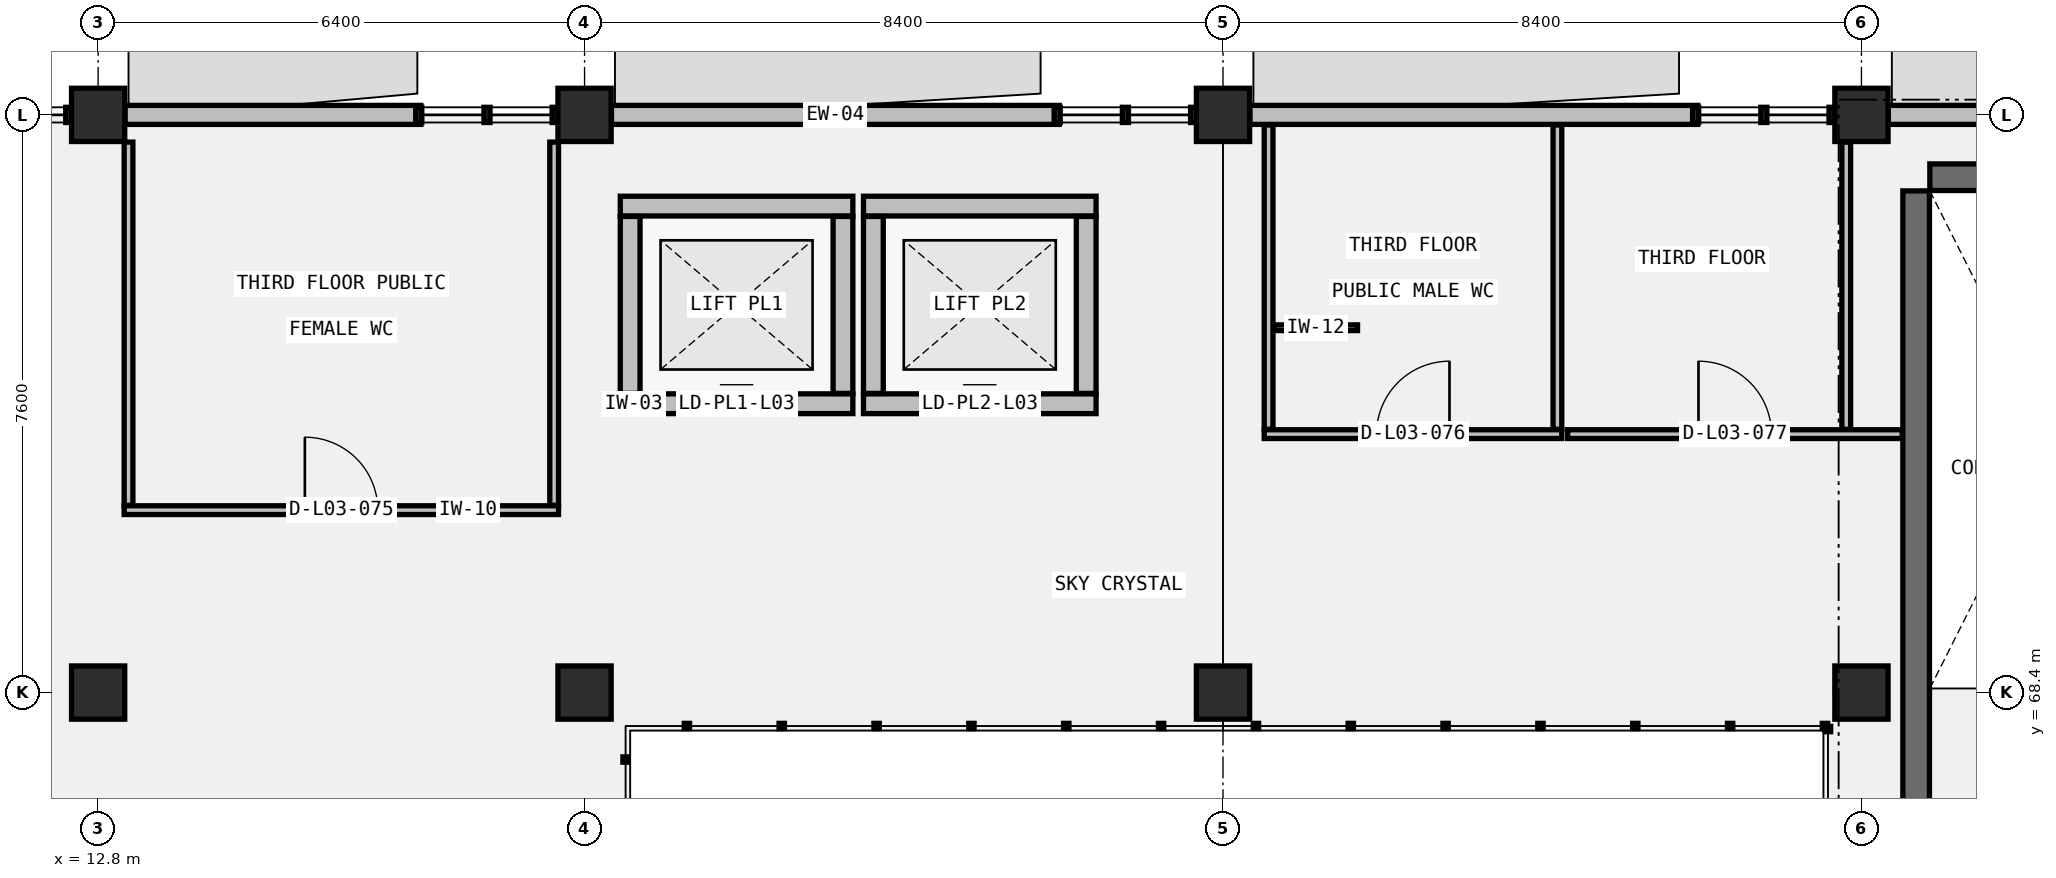
"""IFC4 building model, lengths in metres.
Left out: names, types, materials, properties, quantities, classifications, styles, units other than length and angle.
Written with IfcOpenShell. Run it as: python <this file> out.ifc"""

import sys

from ifc_helpers import new_model, si_unit, direction, frame, frame_2d, origin, origin_2d, place, context, subcontext, project, spatial, rectangle, circle, extrude, element, fill, save


model = new_model("IFC4")
c1 = context("Model", 3, precision=1e-05, world=origin(), true_north=direction((0.0, 1.0)))
c2 = subcontext(c1, "Body", "Model", "MODEL_VIEW")
j1 = project(units=[si_unit("LENGTHUNIT", "METRE"), si_unit("PLANEANGLEUNIT", "RADIAN")], contexts=[c1])
p1 = place(None, origin())
s1 = spatial("IfcSite", under=j1, at=p1, CompositionType="ELEMENT")
p2 = place(p1, origin())
s2 = spatial("IfcBuilding", under=s1, at=p2, CompositionType="ELEMENT")
p3 = place(p2, frame((0.0, 0.0, 14.6)))
s3 = spatial("IfcBuildingStorey", under=s2, at=p3, CompositionType="ELEMENT", Elevation=14.6)
for number, where, z_axis, x_axis in (
    (1, (12.8, 68.4, 0.0), (0.0, 0.0, 1.0), (1.0, 0.0, 0.0)),
    (2, (12.8, 76.0, 0.0), (0.0, 0.0, 1.0), (1.0, 0.0, 0.0)),
    (3, (19.2, 68.4, 0.0), (0.0, 0.0, 1.0), (1.0, 0.0, 0.0)),
    (4, (19.2, 76.0, 0.0), (0.0, 0.0, 1.0), (1.0, 0.0, 0.0)),
    (5, (27.6, 68.4, 0.0), (0.0, 0.0, 1.0), (1.0, 0.0, 0.0)),
    (6, (27.6, 76.0, 0.0), (0.0, 0.0, 1.0), (1.0, 0.0, 0.0)),
    (7, (36.0, 68.4, 0.0), (0.0, 0.0, 1.0), (1.0, 0.0, 0.0)),
    (8, (36.0, 76.0, 0.0), (0.0, 0.0, 1.0), (1.0, 0.0, 0.0)),
):
    element("IfcColumn", number, at=place(p3, frame(where, z_axis=z_axis, x_axis=x_axis)), inside=s3, PredefinedType="COLUMN", context=c2, shape_type="SweptSolid", body=[
        extrude(circle(Radius=0.35, at=origin_2d()), origin(), (0.0, 0.0, 1.0), 4.6),
    ])
p4 = place(p3, frame((40.2, 75.18, 0.0), z_axis=(0.0, 0.0, 1.0), x_axis=(-1.0, 0.0, 0.0)))
e9 = element("IfcWall", 9, at=p4, inside=s3, PredefinedType="SHEAR", context=c2, shape_type="SweptSolid", body=[
    extrude(rectangle(XDim=3.3, YDim=0.35, at=frame_2d((1.65, 0.0))), origin(), (0.0, 0.0, 1.0), 4.36),
])
p5 = place(p3, frame((36.72, 75.0, 0.0), z_axis=(0.0, 0.0, 1.0), x_axis=(0.0, -1.0, 0.0)))
e10 = element("IfcWall", 10, at=p5, inside=s3, PredefinedType="SHEAR", context=c2, shape_type="SweptSolid", body=[
    extrude(rectangle(XDim=8.15, YDim=0.35, at=frame_2d((4.075, 0.0))), origin(), (0.0, 0.0, 1.0), 4.36),
])
p6 = place(p3, frame((13.154, 76.0, 0.0), z_axis=(0.0, 0.0, 1.0), x_axis=(1.0, 0.0, 0.0)))
e11 = element("IfcWall", 11, at=p6, inside=s3, PredefinedType="STANDARD", context=c2, shape_type="SweptSolid", body=[
    extrude(rectangle(XDim=3.892, YDim=0.25, at=frame_2d((1.946, 0.0))), origin(), (0.0, 0.0, 1.0), 3.638),
])
p7 = place(p3, frame((19.554, 76.0, 0.0), z_axis=(0.0, 0.0, 1.0), x_axis=(1.0, 0.0, 0.0)))
e12 = element("IfcWall", 12, at=p7, inside=s3, PredefinedType="STANDARD", context=c2, shape_type="SweptSolid", body=[
    extrude(rectangle(XDim=5.892, YDim=0.25, at=frame_2d((2.946, 0.0))), origin(), (0.0, 0.0, 1.0), 3.638),
])
p8 = place(p3, frame((27.954, 76.0, 0.0), z_axis=(0.0, 0.0, 1.0), x_axis=(1.0, 0.0, 0.0)))
e13 = element("IfcWall", 13, at=p8, inside=s3, PredefinedType="STANDARD", context=c2, shape_type="SweptSolid", body=[
    extrude(rectangle(XDim=5.892, YDim=0.25, at=frame_2d((2.946, 0.0))), origin(), (0.0, 0.0, 1.0), 4.34),
])
p9 = place(p3, frame((36.354, 76.0, 0.0), z_axis=(0.0, 0.0, 1.0), x_axis=(1.0, 0.0, 0.0)))
e14 = element("IfcWall", 14, at=p9, inside=s3, PredefinedType="STANDARD", context=c2, shape_type="SweptSolid", body=[
    extrude(rectangle(XDim=5.842, YDim=0.25, at=frame_2d((2.921, 0.0))), origin(), (0.0, 0.0, 1.0), 4.34),
])
p10 = place(p3, frame((19.67, 72.2, 0.0), z_axis=(0.0, 0.0, 1.0), x_axis=(1.0, 0.0, 0.0)))
e15 = element("IfcWall", 15, at=p10, inside=s3, PredefinedType="STANDARD", context=c2, shape_type="SweptSolid", body=[
    extrude(rectangle(XDim=3.06, YDim=0.26, at=frame_2d((1.53, 0.0))), origin(), (0.0, 0.0, 1.0), 4.36),
])
p11 = place(p10, frame((0.955, 0.0, 0.0)))
e16 = element("IfcOpeningElement", 16, at=p11, cuts=e15, PredefinedType="OPENING", context=c2, shape_type="SweptSolid", body=[
    extrude(rectangle(XDim=1.15, YDim=2.15, at=frame_2d((0.575, 1.075))), frame((0.0, 0.14, 0.0), z_axis=(0.0, -1.0, 0.0), x_axis=(1.0, 0.0, 0.0)), (0.0, 0.0, 1.0), 0.28),
])
p12 = place(p3, frame((19.67, 74.8, 0.0), z_axis=(0.0, 0.0, 1.0), x_axis=(1.0, 0.0, 0.0)))
e17 = element("IfcWall", 17, at=p12, inside=s3, PredefinedType="STANDARD", context=c2, shape_type="SweptSolid", body=[
    extrude(rectangle(XDim=3.06, YDim=0.26, at=frame_2d((1.53, 0.0))), origin(), (0.0, 0.0, 1.0), 4.36),
])
for number, where, z_axis, x_axis in (
    (18, (19.8, 72.336, 0.0), (0.0, 0.0, 1.0), (0.0, 1.0, 0.0)),
    (19, (22.6, 72.336, 0.0), (0.0, 0.0, 1.0), (0.0, 1.0, 0.0)),
):
    element("IfcWall", number, at=place(p3, frame(where, z_axis=z_axis, x_axis=x_axis)), inside=s3, PredefinedType="STANDARD", context=c2, shape_type="SweptSolid", body=[
        extrude(rectangle(XDim=2.328, YDim=0.26, at=frame_2d((1.164, 0.0))), origin(), (0.0, 0.0, 1.0), 4.36),
    ])
p13 = place(p3, frame((22.87, 72.2, 0.0), z_axis=(0.0, 0.0, 1.0), x_axis=(1.0, 0.0, 0.0)))
e20 = element("IfcWall", 20, at=p13, inside=s3, PredefinedType="STANDARD", context=c2, shape_type="SweptSolid", body=[
    extrude(rectangle(XDim=3.06, YDim=0.26, at=frame_2d((1.53, 0.0))), origin(), (0.0, 0.0, 1.0), 4.36),
])
p14 = place(p13, frame((0.92, 0.0, 0.0)))
e21 = element("IfcOpeningElement", 21, at=p14, cuts=e20, PredefinedType="OPENING", context=c2, shape_type="SweptSolid", body=[
    extrude(rectangle(XDim=1.22, YDim=2.2, at=frame_2d((0.61, 1.1))), frame((0.0, 0.14, 0.0), z_axis=(0.0, -1.0, 0.0), x_axis=(1.0, 0.0, 0.0)), (0.0, 0.0, 1.0), 0.28),
])
p15 = place(p3, frame((22.87, 74.8, 0.0), z_axis=(0.0, 0.0, 1.0), x_axis=(1.0, 0.0, 0.0)))
e22 = element("IfcWall", 22, at=p15, inside=s3, PredefinedType="STANDARD", context=c2, shape_type="SweptSolid", body=[
    extrude(rectangle(XDim=3.06, YDim=0.26, at=frame_2d((1.53, 0.0))), origin(), (0.0, 0.0, 1.0), 4.36),
])
for number, where, z_axis, x_axis in (
    (23, (23.0, 72.336, 0.0), (0.0, 0.0, 1.0), (0.0, 1.0, 0.0)),
    (24, (25.8, 72.336, 0.0), (0.0, 0.0, 1.0), (0.0, 1.0, 0.0)),
):
    element("IfcWall", number, at=place(p3, frame(where, z_axis=z_axis, x_axis=x_axis)), inside=s3, PredefinedType="STANDARD", context=c2, shape_type="SweptSolid", body=[
        extrude(rectangle(XDim=2.328, YDim=0.26, at=frame_2d((1.164, 0.0))), origin(), (0.0, 0.0, 1.0), 4.36),
    ])
p16 = place(p3, frame((13.143, 70.8, 0.0), z_axis=(0.0, 0.0, 1.0), x_axis=(1.0, 0.0, 0.0)))
e25 = element("IfcWall", 25, at=p16, inside=s3, PredefinedType="PARTITIONING", context=c2, shape_type="SweptSolid", body=[
    extrude(rectangle(XDim=5.715, YDim=0.115, at=frame_2d((2.857, 0.0))), origin(), (0.0, 0.0, 1.0), 4.36),
])
p17 = place(p16, frame((2.377, 0.0, 0.0)))
e26 = element("IfcOpeningElement", 26, at=p17, cuts=e25, PredefinedType="OPENING", context=c2, shape_type="SweptSolid", body=[
    extrude(rectangle(XDim=0.96, YDim=2.08, at=frame_2d((0.48, 1.04))), frame((0.0, 0.067, 0.0), z_axis=(0.0, -1.0, 0.0), x_axis=(1.0, 0.0, 0.0)), (0.0, 0.0, 1.0), 0.135),
])
for number, where, z_axis, x_axis in (
    (27, (13.2, 70.864, 0.0), (0.0, 0.0, 1.0), (0.0, 1.0, 0.0)),
    (28, (18.8, 70.864, 0.0), (0.0, 0.0, 1.0), (0.0, 1.0, 0.0)),
):
    element("IfcWall", number, at=place(p3, frame(where, z_axis=z_axis, x_axis=x_axis)), inside=s3, PredefinedType="PARTITIONING", context=c2, shape_type="SweptSolid", body=[
        extrude(rectangle(XDim=4.779, YDim=0.115, at=frame_2d((2.389, 0.0))), origin(), (0.0, 0.0, 1.0), 4.36),
    ])
p18 = place(p3, frame((28.143, 71.8, 0.0), z_axis=(0.0, 0.0, 1.0), x_axis=(1.0, 0.0, 0.0)))
e29 = element("IfcWall", 29, at=p18, inside=s3, PredefinedType="PARTITIONING", context=c2, shape_type="SweptSolid", body=[
    extrude(rectangle(XDim=3.915, YDim=0.115, at=frame_2d((1.958, 0.0))), origin(), (0.0, 0.0, 1.0), 4.36),
])
p19 = place(p18, frame((1.478, 0.0, 0.0)))
e30 = element("IfcOpeningElement", 30, at=p19, cuts=e29, PredefinedType="OPENING", context=c2, shape_type="SweptSolid", body=[
    extrude(rectangle(XDim=0.96, YDim=2.08, at=frame_2d((0.48, 1.04))), frame((0.0, 0.067, 0.0), z_axis=(0.0, -1.0, 0.0), x_axis=(1.0, 0.0, 0.0)), (0.0, 0.0, 1.0), 0.135),
])
for number, where, z_axis, x_axis in (
    (31, (28.2, 71.864, 0.0), (0.0, 0.0, 1.0), (0.0, 1.0, 0.0)),
    (32, (32.0, 71.864, 0.0), (0.0, 0.0, 1.0), (0.0, 1.0, 0.0)),
):
    element("IfcWall", number, at=place(p3, frame(where, z_axis=z_axis, x_axis=x_axis)), inside=s3, PredefinedType="PARTITIONING", context=c2, shape_type="SweptSolid", body=[
        extrude(rectangle(XDim=4.003, YDim=0.115, at=frame_2d((2.002, 0.0))), origin(), (0.0, 0.0, 1.0), 4.36),
    ])
p20 = place(p3, frame((32.135, 71.8, 0.0), z_axis=(0.0, 0.0, 1.0), x_axis=(1.0, 0.0, 0.0)))
e33 = element("IfcWall", 33, at=p20, inside=s3, PredefinedType="PARTITIONING", context=c2, shape_type="SweptSolid", body=[
    extrude(rectangle(XDim=4.402, YDim=0.115, at=frame_2d((2.201, 0.0))), origin(), (0.0, 0.0, 1.0), 4.36),
])
p21 = place(p20, frame((1.721, 0.0, 0.0)))
e34 = element("IfcOpeningElement", 34, at=p21, cuts=e33, PredefinedType="OPENING", context=c2, shape_type="SweptSolid", body=[
    extrude(rectangle(XDim=0.96, YDim=2.08, at=frame_2d((0.48, 1.04))), frame((0.0, 0.067, 0.0), z_axis=(0.0, -1.0, 0.0), x_axis=(1.0, 0.0, 0.0)), (0.0, 0.0, 1.0), 0.135),
])
p22 = place(p3, frame((35.8, 71.864, 0.0), z_axis=(0.0, 0.0, 1.0), x_axis=(0.0, 1.0, 0.0)))
e35 = element("IfcWall", 35, at=p22, inside=s3, PredefinedType="PARTITIONING", context=c2, shape_type="SweptSolid", body=[
    extrude(rectangle(XDim=3.779, YDim=0.115, at=frame_2d((1.889, 0.0))), origin(), (0.0, 0.0, 1.0), 4.36),
])
p23 = place(p3, frame((28.27, 73.2, 0.0), z_axis=(0.0, 0.0, 1.0), x_axis=(1.0, 0.0, 0.0)))
e36 = element("IfcWall", 36, at=p23, inside=s3, PredefinedType="PARTITIONING", context=c2, shape_type="SweptSolid", body=[
    extrude(rectangle(XDim=1.1, YDim=0.075, at=frame_2d((0.55, 0.0))), origin(), (0.0, 0.0, 1.0), 2.05),
])
p24 = place(p11, origin())
e37 = element("IfcDoor", 37, at=p24, inside=s3, OperationType="SLIDING_TO_LEFT", PredefinedType="DOOR", context=c2, shape_type="SweptSolid", body=[
    extrude(rectangle(XDim=1.15, YDim=2.15, at=frame_2d((0.575, 1.075))), frame((0.0, 0.025, 0.0), z_axis=(0.0, -1.0, 0.0), x_axis=(1.0, 0.0, 0.0)), (0.0, 0.0, 1.0), 0.05),
])
fill(e16, e37)
p25 = place(p14, origin())
e38 = element("IfcDoor", 38, at=p25, inside=s3, OperationType="SLIDING_TO_RIGHT", PredefinedType="DOOR", context=c2, shape_type="SweptSolid", body=[
    extrude(rectangle(XDim=1.22, YDim=2.2, at=frame_2d((0.61, 1.1))), frame((0.0, 0.025, 0.0), z_axis=(0.0, -1.0, 0.0), x_axis=(1.0, 0.0, 0.0)), (0.0, 0.0, 1.0), 0.05),
])
fill(e21, e38)
p26 = place(p17, origin())
e39 = element("IfcDoor", 39, at=p26, inside=s3, OperationType="SINGLE_SWING_LEFT", PredefinedType="DOOR", context=c2, shape_type="SweptSolid", body=[
    extrude(rectangle(XDim=0.96, YDim=2.08, at=frame_2d((0.48, 1.04))), frame((0.0, 0.025, 0.0), z_axis=(0.0, -1.0, 0.0), x_axis=(1.0, 0.0, 0.0)), (0.0, 0.0, 1.0), 0.05),
])
fill(e26, e39)
p27 = place(p19, origin())
e40 = element("IfcDoor", 40, at=p27, inside=s3, OperationType="SINGLE_SWING_RIGHT", PredefinedType="DOOR", context=c2, shape_type="SweptSolid", body=[
    extrude(rectangle(XDim=0.96, YDim=2.08, at=frame_2d((0.48, 1.04))), frame((0.0, 0.025, 0.0), z_axis=(0.0, -1.0, 0.0), x_axis=(1.0, 0.0, 0.0)), (0.0, 0.0, 1.0), 0.05),
])
fill(e30, e40)
p28 = place(p21, origin())
e41 = element("IfcDoor", 41, at=p28, inside=s3, OperationType="SINGLE_SWING_LEFT", PredefinedType="DOOR", context=c2, shape_type="SweptSolid", body=[
    extrude(rectangle(XDim=0.96, YDim=2.08, at=frame_2d((0.48, 1.04))), frame((0.0, 0.025, 0.0), z_axis=(0.0, -1.0, 0.0), x_axis=(1.0, 0.0, 0.0)), (0.0, 0.0, 1.0), 0.05),
])
fill(e34, e41)
save(model, sys.argv[1])
